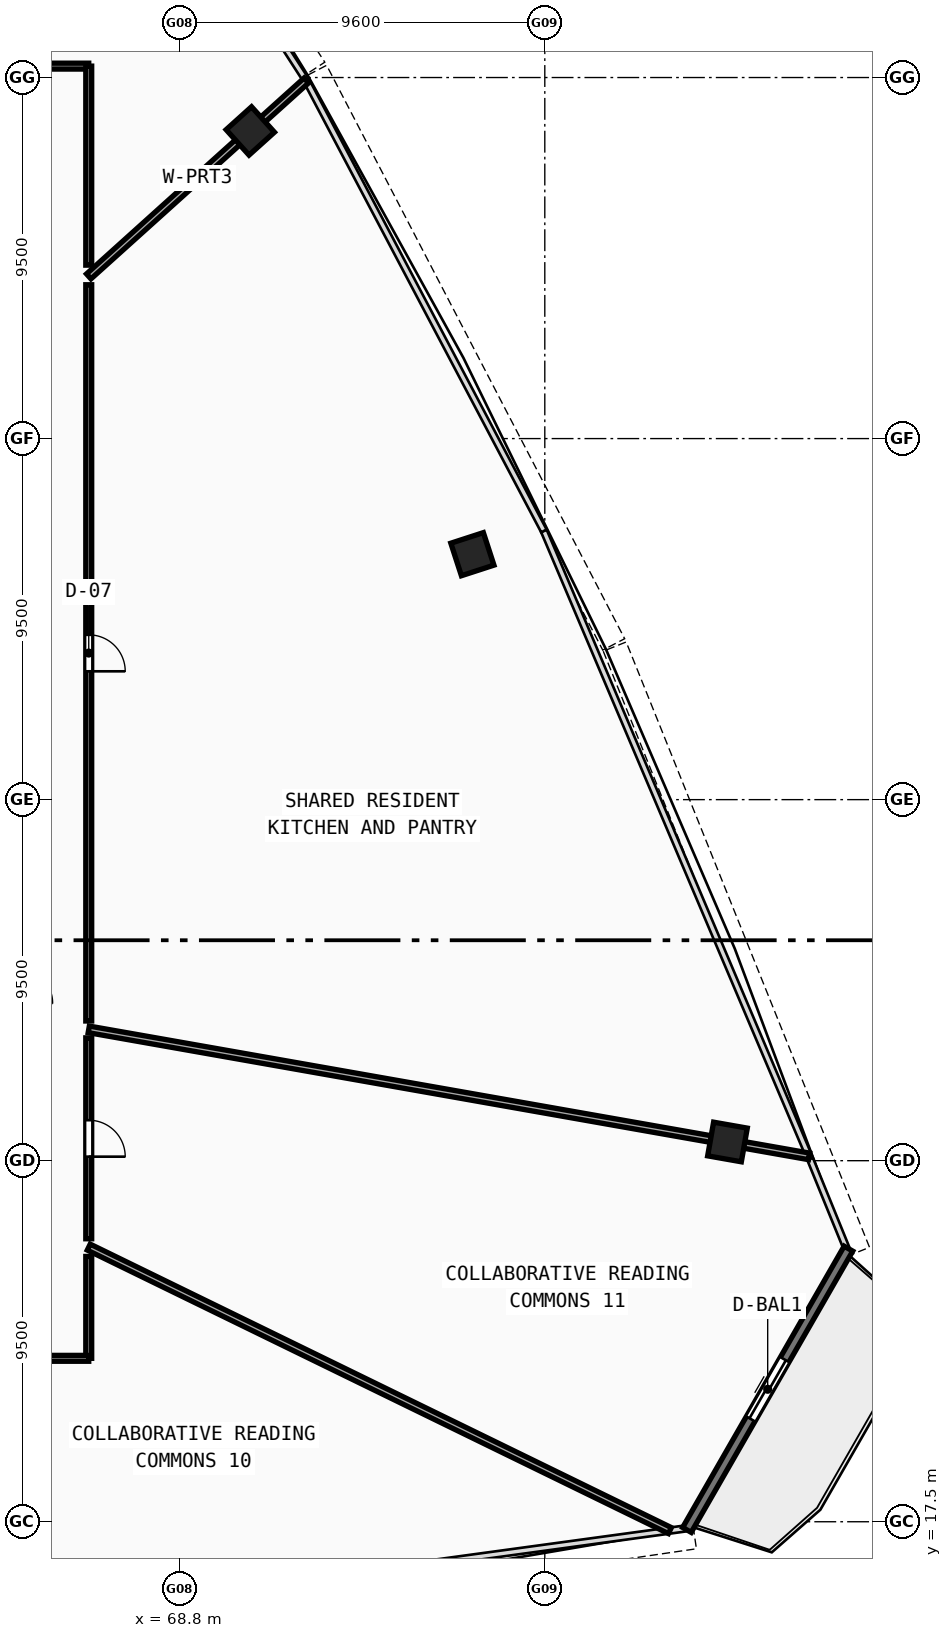
"""IFC4 building model, lengths in metres.
Left out: names, types, materials, properties, quantities, classifications, styles, units other than length and angle.
Written with IfcOpenShell. Run it as: python <this file> out.ifc"""

import sys

from ifc_helpers import new_model, si_unit, direction, frame, frame_2d, origin, origin_with_axes, origin_2d, place, context, subcontext, project, spatial, rectangle, hollow_rectangle, extrude, source, transform, mapped, element, fill, save


model = new_model("IFC4")
c1 = context("Model", 3, precision=1e-05, world=origin(), true_north=direction((0.0, 1.0)))
c2 = subcontext(c1, "Body", "Model", "MODEL_VIEW")
j1 = project(units=[si_unit("LENGTHUNIT", "METRE"), si_unit("PLANEANGLEUNIT", "RADIAN")], contexts=[c1])
p1 = place(None, origin())
s1 = spatial("IfcSite", under=j1, at=p1, CompositionType="ELEMENT")
p2 = place(p1, origin())
s2 = spatial("IfcBuilding", under=s1, at=p2, CompositionType="ELEMENT")
p3 = place(p2, frame((0.0, 0.0, 196.16)))
s3 = spatial("IfcBuildingStorey", under=s2, at=p3, CompositionType="ELEMENT", Elevation=196.16)
m1 = source(origin(), c2, "Body", "SweptSolid", [
    extrude(hollow_rectangle(XDim=0.9, YDim=0.9, WallThickness=0.036, at=origin_2d()), origin(), (0.0, 0.0, 1.0), 3.8),
])
for number, where, z_axis, x_axis in (
    (1, (83.207, 27.492, -0.26), (0.0, 0.0, 1.0), (0.174, 0.985, 0.0)),
    (2, (76.495, 42.958, -0.26), (0.0, 0.0, 1.0), (-0.309, 0.951, 0.0)),
    (3, (70.651, 54.095, -0.26), (0.0, 0.0, 1.0), (-0.669, 0.743, 0.0)),
):
    element("IfcColumn", number, at=place(p3, frame(where, z_axis=z_axis, x_axis=x_axis)), inside=s3, PredefinedType="COLUMN", context=c2, shape_type="MappedRepresentation", body=[
        mapped(m1, transform((0.0, 0.0, 0.0), scale=1.0)),
    ])
p4 = place(p3, frame((82.14, 17.285, 0.0), z_axis=(0.0, 0.0, 1.0), x_axis=(0.497930869929, 0.867216725376, 0.0)))
e4 = element("IfcWall", 4, at=p4, inside=s3, PredefinedType="STANDARD", context=c2, shape_type="SweptSolid", body=[
    extrude(rectangle(XDim=8.534, YDim=0.26, at=frame_2d((4.267, 0.0))), origin(), (0.0, 0.0, 1.0), 3.54),
])
p5 = place(p4, frame((3.367, 0.0, 0.0)))
e5 = element("IfcOpeningElement", 5, at=p5, cuts=e4, PredefinedType="OPENING", context=c2, shape_type="SweptSolid", body=[
    extrude(rectangle(XDim=1.8, YDim=2.15, at=frame_2d((0.9, 1.075))), frame((0.0, 0.14, 0.0), z_axis=(0.0, -1.0, 0.0), x_axis=(1.0, 0.0, 0.0)), (0.0, 0.0, 1.0), 0.28),
])
p6 = place(p3, frame((66.4, 50.267, 0.0), z_axis=(0.0, 0.0, 1.0), x_axis=(0.743141257722, 0.669134568731, 0.0)))
e6 = element("IfcWall", 6, at=p6, inside=s3, PredefinedType="PARTITIONING", context=c2, shape_type="SweptSolid", body=[
    extrude(rectangle(XDim=7.703, YDim=0.175, at=frame_2d((3.852, 0.0))), origin(), (0.0, 0.0, 1.0), 2.89),
])
p7 = place(p3, frame((66.4, 24.726, 0.0), z_axis=(0.0, 0.0, 1.0), x_axis=(0.898797681505, -0.438363693435, 0.0)))
e7 = element("IfcWall", 7, at=p7, inside=s3, PredefinedType="PARTITIONING", context=c2, shape_type="SweptSolid", body=[
    extrude(rectangle(XDim=17.013, YDim=0.175, at=frame_2d((8.507, 0.0))), origin(), (0.0, 0.0, 1.0), 2.89),
])
p8 = place(p3, frame((66.4, 30.456, 0.0), z_axis=(0.0, 0.0, 1.0), x_axis=(0.984807685374, -0.173648561263, 0.0)))
e8 = element("IfcWall", 8, at=p8, inside=s3, PredefinedType="PARTITIONING", context=c2, shape_type="SweptSolid", body=[
    extrude(rectangle(XDim=19.246, YDim=0.175, at=frame_2d((9.623, 0.0))), origin(), (0.0, 0.0, 1.0), 2.89),
])
p9 = place(p3, frame((58.08, 55.8, 0.0), z_axis=(0.0, 0.0, 1.0), x_axis=(1.0, 0.0, 0.0)))
e9 = element("IfcWall", 9, at=p9, inside=s3, PredefinedType="PARTITIONING", context=c2, shape_type="SweptSolid", body=[
    extrude(rectangle(XDim=8.32, YDim=0.155, at=frame_2d((4.16, 0.0))), origin(), (0.0, 0.0, 1.0), 3.14),
])
p10 = place(p9, frame((3.809, 0.0, 0.0)))
e10 = element("IfcOpeningElement", 10, at=p10, cuts=e9, PredefinedType="OPENING", context=c2, shape_type="SweptSolid", body=[
    extrude(rectangle(XDim=0.92, YDim=2.1, at=frame_2d((0.46, 1.05))), frame((0.0, 0.087, 0.0), z_axis=(0.0, -1.0, 0.0), x_axis=(1.0, 0.0, 0.0)), (0.0, 0.0, 1.0), 0.175),
])
p11 = place(p3, frame((66.4, 55.8, 0.0), z_axis=(0.0, 0.0, 1.0), x_axis=(0.0, -1.0, 0.0)))
e11 = element("IfcWall", 11, at=p11, inside=s3, PredefinedType="PARTITIONING", context=c2, shape_type="SweptSolid", body=[
    extrude(rectangle(XDim=5.237, YDim=0.155, at=frame_2d((2.618, 0.0))), origin(), (0.0, 0.0, 1.0), 3.54),
])
p12 = place(p3, frame((66.4, 50.048, 0.0), z_axis=(0.0, 0.0, 1.0), x_axis=(0.0, -1.0, 0.0)))
e12 = element("IfcWall", 12, at=p12, inside=s3, PredefinedType="PARTITIONING", context=c2, shape_type="SweptSolid", body=[
    extrude(rectangle(XDim=19.372, YDim=0.155, at=frame_2d((9.686, 0.0))), origin(), (0.0, 0.0, 1.0), 2.89),
])
p13 = place(p12, frame((9.211, 0.0, 0.0)))
e13 = element("IfcOpeningElement", 13, at=p13, cuts=e12, PredefinedType="OPENING", context=c2, shape_type="SweptSolid", body=[
    extrude(rectangle(XDim=0.96, YDim=2.12, at=frame_2d((0.48, 1.06))), frame((0.0, 0.087, 0.0), z_axis=(0.0, -1.0, 0.0), x_axis=(1.0, 0.0, 0.0)), (0.0, 0.0, 1.0), 0.175),
])
p14 = place(p3, frame((66.4, 30.232, 0.0), z_axis=(0.0, 0.0, 1.0), x_axis=(0.0, -1.0, 0.0)))
e14 = element("IfcWall", 14, at=p14, inside=s3, PredefinedType="PARTITIONING", context=c2, shape_type="SweptSolid", body=[
    extrude(rectangle(XDim=5.287, YDim=0.155, at=frame_2d((2.643, 0.0))), origin(), (0.0, 0.0, 1.0), 3.14),
])
p15 = place(p14, frame((2.167, 0.0, 0.0)))
e15 = element("IfcOpeningElement", 15, at=p15, cuts=e14, PredefinedType="OPENING", context=c2, shape_type="SweptSolid", body=[
    extrude(rectangle(XDim=0.96, YDim=2.12, at=frame_2d((0.48, 1.06))), frame((0.0, 0.087, 0.0), z_axis=(0.0, -1.0, 0.0), x_axis=(1.0, 0.0, 0.0)), (0.0, 0.0, 1.0), 0.175),
])
p16 = place(p3, frame((66.4, 24.481, 0.0), z_axis=(0.0, 0.0, 1.0), x_axis=(0.0, -1.0, 0.0)))
e16 = element("IfcWall", 16, at=p16, inside=s3, PredefinedType="PARTITIONING", context=c2, shape_type="SweptSolid", body=[
    extrude(rectangle(XDim=2.681, YDim=0.155, at=frame_2d((1.34, 0.0))), origin(), (0.0, 0.0, 1.0), 3.14),
])
p17 = place(p3, frame((66.4, 21.8, 0.0), z_axis=(0.0, 0.0, 1.0), x_axis=(-1.0, 0.0, 0.0)))
e17 = element("IfcWall", 17, at=p17, inside=s3, PredefinedType="PARTITIONING", context=c2, shape_type="SweptSolid", body=[
    extrude(rectangle(XDim=8.127, YDim=0.155, at=frame_2d((4.064, 0.0))), origin(), (0.0, 0.0, 1.0), 3.14),
])
p18 = place(p17, frame((3.502, 0.0, 0.0)))
e18 = element("IfcOpeningElement", 18, at=p18, cuts=e17, PredefinedType="OPENING", context=c2, shape_type="SweptSolid", body=[
    extrude(rectangle(XDim=0.96, YDim=2.12, at=frame_2d((0.48, 1.06))), frame((0.0, 0.087, 0.0), z_axis=(0.0, -1.0, 0.0), x_axis=(1.0, 0.0, 0.0)), (0.0, 0.0, 1.0), 0.175),
])
m2 = source(origin(), c2, "Body", "SweptSolid", [
    extrude(rectangle(XDim=1.8, YDim=2.15, at=frame_2d((0.9, 1.075))), frame((0.0, 0.025, 0.0), z_axis=(0.0, -1.0, 0.0), x_axis=(1.0, 0.0, 0.0)), (0.0, 0.0, 1.0), 0.05),
])
p19 = place(p5, origin_with_axes())
e19 = element("IfcDoor", 19, at=p19, inside=s3, OperationType="DOUBLE_DOOR_SLIDING", PredefinedType="DOOR", context=c2, shape_type="MappedRepresentation", body=[
    mapped(m2, transform((0.0, 0.0, 0.0), scale=1.0)),
])
fill(e5, e19)
m3 = source(origin(), c2, "Body", "SweptSolid", [
    extrude(rectangle(XDim=0.96, YDim=2.12, at=frame_2d((0.48, 1.06))), frame((0.0, 0.025, 0.0), z_axis=(0.0, -1.0, 0.0), x_axis=(1.0, 0.0, 0.0)), (0.0, 0.0, 1.0), 0.05),
])
p20 = place(p13, origin_with_axes())
e20 = element("IfcDoor", 20, at=p20, inside=s3, OperationType="SINGLE_SWING_RIGHT", PredefinedType="DOOR", context=c2, shape_type="MappedRepresentation", body=[
    mapped(m3, transform((0.0, 0.0, 0.0), scale=1.0)),
])
fill(e13, e20)
p21 = place(p15, origin_with_axes())
e21 = element("IfcDoor", 21, at=p21, inside=s3, OperationType="SINGLE_SWING_RIGHT", PredefinedType="DOOR", context=c2, shape_type="MappedRepresentation", body=[
    mapped(m3, transform((0.0, 0.0, 0.0), scale=1.0)),
])
fill(e15, e21)
save(model, sys.argv[1])
